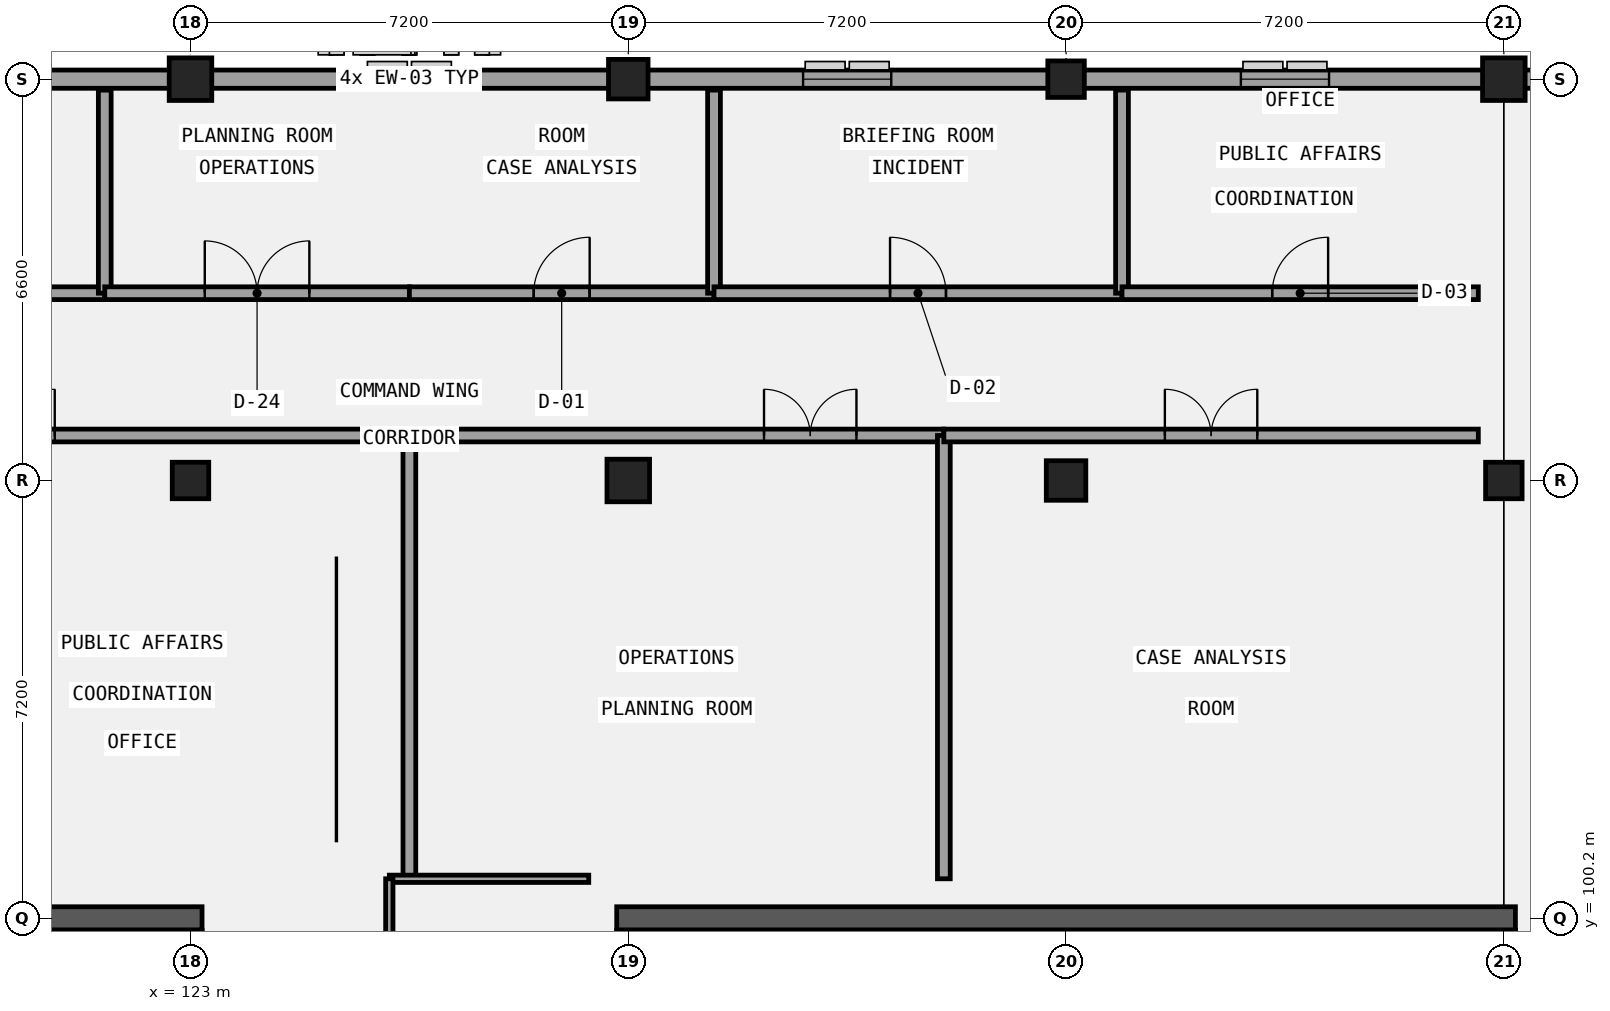
"""IFC4 building model, lengths in metres.
Left out: names, types, materials, properties, quantities, classifications, styles, units other than length and angle.
Written with IfcOpenShell. Run it as: python <this file> out.ifc"""

import sys

from ifc_helpers import new_model, si_unit, direction, frame, frame_2d, origin, origin_2d, place, context, subcontext, project, spatial, rectangle, extrude, element, fill, save


model = new_model("IFC4")
c1 = context("Model", 3, precision=1e-05, world=origin(), true_north=direction((0.0, 1.0)))
c2 = subcontext(c1, "Body", "Model", "MODEL_VIEW")
j1 = project(units=[si_unit("LENGTHUNIT", "METRE"), si_unit("PLANEANGLEUNIT", "RADIAN")], contexts=[c1])
p1 = place(None, origin())
s1 = spatial("IfcSite", under=j1, at=p1, CompositionType="ELEMENT")
p2 = place(p1, origin())
s2 = spatial("IfcBuilding", under=s1, at=p2, CompositionType="ELEMENT")
p3 = place(p2, frame((0.0, 0.0, 9.6)))
s3 = spatial("IfcBuildingStorey", under=s2, at=p3, CompositionType="ELEMENT", Elevation=9.6)
p4 = place(p3, frame((108.41, 100.2, 0.0), z_axis=(0.0, 0.0, 1.0), x_axis=(1.0, 0.0, 0.0)))
e1 = element("IfcWall", 1, at=p4, inside=s3, PredefinedType="SHEAR", context=c2, shape_type="SweptSolid", body=[
    extrude(rectangle(XDim=14.78, YDim=0.38, at=frame_2d((7.39, 0.0))), origin(), (0.0, 0.0, 1.0), 4.2),
])
p5 = place(p3, frame((123.0, 93.2, 0.0), z_axis=(0.0, 0.0, 1.0), x_axis=(0.0, 1.0, 0.0)))
e2 = element("IfcWall", 2, at=p5, inside=s3, PredefinedType="SHEAR", context=c2, shape_type="SweptSolid", body=[
    extrude(rectangle(XDim=6.8, YDim=0.38, at=frame_2d((3.4, 0.0))), origin(), (0.0, 0.0, 1.0), 4.2),
])
p6 = place(p3, frame((122.34, 96.82, 0.0), z_axis=(0.0, 0.0, 1.0), x_axis=(0.0, 1.0, 0.0)))
e3 = element("IfcWall", 3, at=p6, inside=s3, PredefinedType="SHEAR", context=c2, shape_type="SweptSolid", body=[
    extrude(rectangle(XDim=3.18, YDim=0.38, at=frame_2d((1.59, 0.0))), origin(), (0.0, 0.0, 1.0), 4.2),
])
p7 = place(p3, frame((130.01, 100.2, 0.0), z_axis=(0.0, 0.0, 1.0), x_axis=(1.0, 0.0, 0.0)))
e4 = element("IfcWall", 4, at=p7, inside=s3, PredefinedType="SHEAR", context=c2, shape_type="SweptSolid", body=[
    extrude(rectangle(XDim=14.78, YDim=0.38, at=frame_2d((7.39, 0.0))), origin(), (0.0, 0.0, 1.0), 4.2),
])
for number, where, z_axis, x_axis in (
    (5, (130.2, 93.2, 0.0), (0.0, 0.0, 1.0), (0.0, 1.0, 0.0)),
    (6, (144.6, 93.2, 0.0), (0.0, 0.0, 1.0), (0.0, 1.0, 0.0)),
):
    element("IfcWall", number, at=place(p3, frame(where, z_axis=z_axis, x_axis=x_axis)), inside=s3, PredefinedType="SHEAR", context=c2, shape_type="SweptSolid", body=[
        extrude(rectangle(XDim=6.8, YDim=0.38, at=frame_2d((3.4, 0.0))), origin(), (0.0, 0.0, 1.0), 4.2),
    ])
for number, where, z_axis, x_axis in (
    (7, (138.18, 96.82, 0.0), (0.0, 0.0, 1.0), (0.0, 1.0, 0.0)),
    (8, (140.1, 96.82, 0.0), (0.0, 0.0, 1.0), (0.0, 1.0, 0.0)),
    (9, (142.02, 96.82, 0.0), (0.0, 0.0, 1.0), (0.0, 1.0, 0.0)),
    (10, (143.94, 96.82, 0.0), (0.0, 0.0, 1.0), (0.0, 1.0, 0.0)),
):
    element("IfcWall", number, at=place(p3, frame(where, z_axis=z_axis, x_axis=x_axis)), inside=s3, PredefinedType="SHEAR", context=c2, shape_type="SweptSolid", body=[
        extrude(rectangle(XDim=3.18, YDim=0.38, at=frame_2d((1.59, 0.0))), origin(), (0.0, 0.0, 1.0), 4.2),
    ])
p8 = place(p3, frame((123.0, 107.4, 0.0), z_axis=(0.0, 0.0, 1.0), x_axis=(1.0, 0.0, 0.0)))
e11 = element("IfcColumn", 11, at=p8, inside=s3, PredefinedType="COLUMN", context=c2, shape_type="SweptSolid", body=[
    extrude(rectangle(XDim=0.6, YDim=0.6, at=origin_2d()), origin(), (0.0, 0.0, 1.0), 4.2),
])
for number, where, z_axis, x_axis in (
    (12, (123.0, 114.0, 0.0), (0.0, 0.0, 1.0), (1.0, 0.0, 0.0)),
    (13, (130.2, 107.4, 0.0), (0.0, 0.0, 1.0), (1.0, 0.0, 0.0)),
):
    element("IfcColumn", number, at=place(p3, frame(where, z_axis=z_axis, x_axis=x_axis)), inside=s3, PredefinedType="COLUMN", context=c2, shape_type="SweptSolid", body=[
        extrude(rectangle(XDim=0.7, YDim=0.7, at=origin_2d()), origin(), (0.0, 0.0, 1.0), 4.2),
    ])
for number, where, z_axis, x_axis in (
    (14, (130.2, 114.0, 0.0), (0.0, 0.0, 1.0), (1.0, 0.0, 0.0)),
    (15, (137.4, 107.4, 0.0), (0.0, 0.0, 1.0), (1.0, 0.0, 0.0)),
):
    element("IfcColumn", number, at=place(p3, frame(where, z_axis=z_axis, x_axis=x_axis)), inside=s3, PredefinedType="COLUMN", context=c2, shape_type="SweptSolid", body=[
        extrude(rectangle(XDim=0.65, YDim=0.65, at=origin_2d()), origin(), (0.0, 0.0, 1.0), 4.2),
    ])
for number, where, z_axis, x_axis in (
    (16, (137.4, 114.0, 0.0), (0.0, 0.0, 1.0), (1.0, 0.0, 0.0)),
    (17, (144.6, 107.4, 0.0), (0.0, 0.0, 1.0), (1.0, 0.0, 0.0)),
):
    element("IfcColumn", number, at=place(p3, frame(where, z_axis=z_axis, x_axis=x_axis)), inside=s3, PredefinedType="COLUMN", context=c2, shape_type="SweptSolid", body=[
        extrude(rectangle(XDim=0.6, YDim=0.6, at=origin_2d()), origin(), (0.0, 0.0, 1.0), 4.2),
    ])
p9 = place(p3, frame((144.6, 114.0, 0.0), z_axis=(0.0, 0.0, 1.0), x_axis=(1.0, 0.0, 0.0)))
e18 = element("IfcColumn", 18, at=p9, inside=s3, PredefinedType="COLUMN", context=c2, shape_type="SweptSolid", body=[
    extrude(rectangle(XDim=0.7, YDim=0.7, at=origin_2d()), origin(), (0.0, 0.0, 1.0), 4.2),
])
p10 = place(p3, frame((166.35, 114.0, 0.0), z_axis=(0.0, 0.0, 1.0), x_axis=(-1.0, 0.0, 0.0)))
e19 = element("IfcWall", 19, at=p10, inside=s3, PredefinedType="SOLIDWALL", context=c2, shape_type="SweptSolid", body=[
    extrude(rectangle(XDim=21.9, YDim=0.3, at=frame_2d((10.95, 0.0))), origin(), (0.0, 0.0, 1.0), 3.19),
])
p11 = place(p10, frame((17.5, 0.0, 0.95)))
e20 = element("IfcOpeningElement", 20, at=p11, cuts=e19, PredefinedType="OPENING", context=c2, shape_type="SweptSolid", body=[
    extrude(rectangle(XDim=1.3, YDim=1.65, at=frame_2d((0.65, 0.825))), frame((0.0, 0.16, 0.0), z_axis=(0.0, -1.0, 0.0), x_axis=(1.0, 0.0, 0.0)), (0.0, 0.0, 1.0), 0.32),
])
p12 = place(p3, frame((144.75, 114.0, 0.0), z_axis=(0.0, 0.0, 1.0), x_axis=(-1.0, 0.0, 0.0)))
e21 = element("IfcWall", 21, at=p12, inside=s3, PredefinedType="SOLIDWALL", context=c2, shape_type="SweptSolid", body=[
    extrude(rectangle(XDim=36.3, YDim=0.3, at=frame_2d((18.15, 0.0))), origin(), (0.0, 0.0, 1.0), 3.19),
])
p13 = place(p12, frame((31.9, 0.0, 0.95)))
e22 = element("IfcOpeningElement", 22, at=p13, cuts=e21, PredefinedType="OPENING", context=c2, shape_type="SweptSolid", body=[
    extrude(rectangle(XDim=1.3, YDim=1.65, at=frame_2d((0.65, 0.825))), frame((0.0, 0.16, 0.0), z_axis=(0.0, -1.0, 0.0), x_axis=(1.0, 0.0, 0.0)), (0.0, 0.0, 1.0), 0.32),
])
p14 = place(p12, frame((24.7, 0.0, 0.95)))
e23 = element("IfcOpeningElement", 23, at=p14, cuts=e21, PredefinedType="OPENING", context=c2, shape_type="SweptSolid", body=[
    extrude(rectangle(XDim=1.3, YDim=1.9, at=frame_2d((0.65, 0.95))), frame((0.0, 0.16, 0.0), z_axis=(0.0, -1.0, 0.0), x_axis=(1.0, 0.0, 0.0)), (0.0, 0.0, 1.0), 0.32),
])
p15 = place(p12, frame((17.425, 0.0, 0.95)))
e24 = element("IfcOpeningElement", 24, at=p15, cuts=e21, PredefinedType="OPENING", context=c2, shape_type="SweptSolid", body=[
    extrude(rectangle(XDim=1.45, YDim=1.4, at=frame_2d((0.725, 0.7))), frame((0.0, 0.16, 0.0), z_axis=(0.0, -1.0, 0.0), x_axis=(1.0, 0.0, 0.0)), (0.0, 0.0, 1.0), 0.32),
])
p16 = place(p12, frame((10.225, 0.0, 0.95)))
e25 = element("IfcOpeningElement", 25, at=p16, cuts=e21, PredefinedType="OPENING", context=c2, shape_type="SweptSolid", body=[
    extrude(rectangle(XDim=1.45, YDim=1.65, at=frame_2d((0.725, 0.825))), frame((0.0, 0.16, 0.0), z_axis=(0.0, -1.0, 0.0), x_axis=(1.0, 0.0, 0.0)), (0.0, 0.0, 1.0), 0.32),
])
p17 = place(p12, frame((3.025, 0.0, 0.95)))
e26 = element("IfcOpeningElement", 26, at=p17, cuts=e21, PredefinedType="OPENING", context=c2, shape_type="SweptSolid", body=[
    extrude(rectangle(XDim=1.45, YDim=1.9, at=frame_2d((0.725, 0.95))), frame((0.0, 0.16, 0.0), z_axis=(0.0, -1.0, 0.0), x_axis=(1.0, 0.0, 0.0)), (0.0, 0.0, 1.0), 0.32),
])
p18 = place(p3, frame((117.81, 108.14, 0.0), z_axis=(0.0, 0.0, 1.0), x_axis=(1.0, 0.0, 0.0)))
e27 = element("IfcWall", 27, at=p18, inside=s3, PredefinedType="PARTITIONING", context=c2, shape_type="SweptSolid", body=[
    extrude(rectangle(XDim=8.79, YDim=0.21, at=frame_2d((4.395, 0.0))), origin(), (0.0, 0.0, 1.0), 3.94),
])
p19 = place(p18, frame((1.438, 0.0, 0.0)))
e28 = element("IfcOpeningElement", 28, at=p19, cuts=e27, PredefinedType="OPENING", context=c2, shape_type="SweptSolid", body=[
    extrude(rectangle(XDim=1.52, YDim=2.1, at=frame_2d((0.76, 1.05))), frame((0.0, 0.115, 0.0), z_axis=(0.0, -1.0, 0.0), x_axis=(1.0, 0.0, 0.0)), (0.0, 0.0, 1.0), 0.23),
])
p20 = place(p3, frame((126.6, 100.85, 0.0), z_axis=(0.0, 0.0, 1.0), x_axis=(0.0, 1.0, 0.0)))
e29 = element("IfcWall", 29, at=p20, inside=s3, PredefinedType="PARTITIONING", context=c2, shape_type="SweptSolid", body=[
    extrude(rectangle(XDim=7.29, YDim=0.21, at=frame_2d((3.645, 0.0))), origin(), (0.0, 0.0, 1.0), 3.94),
])
p21 = place(p3, frame((126.6, 108.14, 0.0), z_axis=(0.0, 0.0, 1.0), x_axis=(1.0, 0.0, 0.0)))
e30 = element("IfcWall", 30, at=p21, inside=s3, PredefinedType="PARTITIONING", context=c2, shape_type="SweptSolid", body=[
    extrude(rectangle(XDim=8.79, YDim=0.21, at=frame_2d((4.395, 0.0))), origin(), (0.0, 0.0, 1.0), 3.94),
])
p22 = place(p21, frame((5.833, 0.0, 0.0)))
e31 = element("IfcOpeningElement", 31, at=p22, cuts=e30, PredefinedType="OPENING", context=c2, shape_type="SweptSolid", body=[
    extrude(rectangle(XDim=1.52, YDim=2.22, at=frame_2d((0.76, 1.11))), frame((0.0, 0.115, 0.0), z_axis=(0.0, -1.0, 0.0), x_axis=(1.0, 0.0, 0.0)), (0.0, 0.0, 1.0), 0.23),
])
p23 = place(p3, frame((135.39, 100.85, 0.0), z_axis=(0.0, 0.0, 1.0), x_axis=(0.0, 1.0, 0.0)))
e32 = element("IfcWall", 32, at=p23, inside=s3, PredefinedType="PARTITIONING", context=c2, shape_type="SweptSolid", body=[
    extrude(rectangle(XDim=7.29, YDim=0.21, at=frame_2d((3.645, 0.0))), origin(), (0.0, 0.0, 1.0), 3.94),
])
p24 = place(p3, frame((135.39, 108.14, 0.0), z_axis=(0.0, 0.0, 1.0), x_axis=(1.0, 0.0, 0.0)))
e33 = element("IfcWall", 33, at=p24, inside=s3, PredefinedType="PARTITIONING", context=c2, shape_type="SweptSolid", body=[
    extrude(rectangle(XDim=8.79, YDim=0.21, at=frame_2d((4.395, 0.0))), origin(), (0.0, 0.0, 1.0), 3.94),
])
p25 = place(p24, frame((3.635, 0.0, 0.0)))
e34 = element("IfcOpeningElement", 34, at=p25, cuts=e33, PredefinedType="OPENING", context=c2, shape_type="SweptSolid", body=[
    extrude(rectangle(XDim=1.52, YDim=2.35, at=frame_2d((0.76, 1.175))), frame((0.0, 0.115, 0.0), z_axis=(0.0, -1.0, 0.0), x_axis=(1.0, 0.0, 0.0)), (0.0, 0.0, 1.0), 0.23),
])
p26 = place(p3, frame((114.88, 110.48, 0.0), z_axis=(0.0, 0.0, 1.0), x_axis=(1.0, 0.0, 0.0)))
e35 = element("IfcWall", 35, at=p26, inside=s3, PredefinedType="PARTITIONING", context=c2, shape_type="SweptSolid", body=[
    extrude(rectangle(XDim=6.71, YDim=0.21, at=frame_2d((3.355, 0.0))), origin(), (0.0, 0.0, 1.0), 3.39),
])
p27 = place(p26, frame((2.495, 0.0, 0.0)))
e36 = element("IfcOpeningElement", 36, at=p27, cuts=e35, PredefinedType="OPENING", context=c2, shape_type="SweptSolid", body=[
    extrude(rectangle(XDim=1.72, YDim=2.22, at=frame_2d((0.86, 1.11))), frame((0.0, 0.115, 0.0), z_axis=(0.0, -1.0, 0.0), x_axis=(1.0, 0.0, 0.0)), (0.0, 0.0, 1.0), 0.23),
])
p28 = place(p3, frame((121.59, 110.48, 0.0), z_axis=(0.0, 0.0, 1.0), x_axis=(0.0, 1.0, 0.0)))
e37 = element("IfcWall", 37, at=p28, inside=s3, PredefinedType="PARTITIONING", context=c2, shape_type="SweptSolid", body=[
    extrude(rectangle(XDim=3.34, YDim=0.21, at=frame_2d((1.67, 0.0))), origin(), (0.0, 0.0, 1.0), 3.94),
])
p29 = place(p3, frame((121.59, 110.48, 0.0), z_axis=(0.0, 0.0, 1.0), x_axis=(1.0, 0.0, 0.0)))
e38 = element("IfcWall", 38, at=p29, inside=s3, PredefinedType="PARTITIONING", context=c2, shape_type="SweptSolid", body=[
    extrude(rectangle(XDim=5.01, YDim=0.21, at=frame_2d((2.505, 0.0))), origin(), (0.0, 0.0, 1.0), 3.39),
])
p30 = place(p29, frame((1.645, 0.0, 0.0)))
e39 = element("IfcOpeningElement", 39, at=p30, cuts=e38, PredefinedType="OPENING", context=c2, shape_type="SweptSolid", body=[
    extrude(rectangle(XDim=1.72, YDim=2.35, at=frame_2d((0.86, 1.175))), frame((0.0, 0.115, 0.0), z_axis=(0.0, -1.0, 0.0), x_axis=(1.0, 0.0, 0.0)), (0.0, 0.0, 1.0), 0.23),
])
p31 = place(p3, frame((126.6, 110.48, 0.0), z_axis=(0.0, 0.0, 1.0), x_axis=(1.0, 0.0, 0.0)))
e40 = element("IfcWall", 40, at=p31, inside=s3, PredefinedType="PARTITIONING", context=c2, shape_type="SweptSolid", body=[
    extrude(rectangle(XDim=5.01, YDim=0.21, at=frame_2d((2.505, 0.0))), origin(), (0.0, 0.0, 1.0), 3.39),
])
p32 = place(p31, frame((2.045, 0.0, 0.0)))
e41 = element("IfcOpeningElement", 41, at=p32, cuts=e40, PredefinedType="OPENING", context=c2, shape_type="SweptSolid", body=[
    extrude(rectangle(XDim=0.92, YDim=2.1, at=frame_2d((0.46, 1.05))), frame((0.0, 0.115, 0.0), z_axis=(0.0, -1.0, 0.0), x_axis=(1.0, 0.0, 0.0)), (0.0, 0.0, 1.0), 0.23),
])
p33 = place(p3, frame((131.61, 110.48, 0.0), z_axis=(0.0, 0.0, 1.0), x_axis=(0.0, 1.0, 0.0)))
e42 = element("IfcWall", 42, at=p33, inside=s3, PredefinedType="PARTITIONING", context=c2, shape_type="SweptSolid", body=[
    extrude(rectangle(XDim=3.34, YDim=0.21, at=frame_2d((1.67, 0.0))), origin(), (0.0, 0.0, 1.0), 3.94),
])
p34 = place(p3, frame((131.61, 110.48, 0.0), z_axis=(0.0, 0.0, 1.0), x_axis=(1.0, 0.0, 0.0)))
e43 = element("IfcWall", 43, at=p34, inside=s3, PredefinedType="PARTITIONING", context=c2, shape_type="SweptSolid", body=[
    extrude(rectangle(XDim=6.71, YDim=0.21, at=frame_2d((3.355, 0.0))), origin(), (0.0, 0.0, 1.0), 3.39),
])
p35 = place(p34, frame((2.895, 0.0, 0.0)))
e44 = element("IfcOpeningElement", 44, at=p35, cuts=e43, PredefinedType="OPENING", context=c2, shape_type="SweptSolid", body=[
    extrude(rectangle(XDim=0.92, YDim=2.22, at=frame_2d((0.46, 1.11))), frame((0.0, 0.115, 0.0), z_axis=(0.0, -1.0, 0.0), x_axis=(1.0, 0.0, 0.0)), (0.0, 0.0, 1.0), 0.23),
])
p36 = place(p3, frame((138.32, 110.48, 0.0), z_axis=(0.0, 0.0, 1.0), x_axis=(0.0, 1.0, 0.0)))
e45 = element("IfcWall", 45, at=p36, inside=s3, PredefinedType="PARTITIONING", context=c2, shape_type="SweptSolid", body=[
    extrude(rectangle(XDim=3.34, YDim=0.21, at=frame_2d((1.67, 0.0))), origin(), (0.0, 0.0, 1.0), 3.94),
])
p37 = place(p3, frame((138.32, 110.48, 0.0), z_axis=(0.0, 0.0, 1.0), x_axis=(1.0, 0.0, 0.0)))
e46 = element("IfcWall", 46, at=p37, inside=s3, PredefinedType="PARTITIONING", context=c2, shape_type="SweptSolid", body=[
    extrude(rectangle(XDim=5.86, YDim=0.21, at=frame_2d((2.93, 0.0))), origin(), (0.0, 0.0, 1.0), 3.39),
])
p38 = place(p37, frame((2.47, 0.0, 0.0)))
e47 = element("IfcOpeningElement", 47, at=p38, cuts=e46, PredefinedType="OPENING", context=c2, shape_type="SweptSolid", body=[
    extrude(rectangle(XDim=0.92, YDim=2.35, at=frame_2d((0.46, 1.175))), frame((0.0, 0.115, 0.0), z_axis=(0.0, -1.0, 0.0), x_axis=(1.0, 0.0, 0.0)), (0.0, 0.0, 1.0), 0.23),
])
p39 = place(p3, frame((126.27, 100.85, 0.0), z_axis=(0.0, 0.0, 1.0), x_axis=(1.0, 0.0, 0.0)))
e48 = element("IfcWall", 48, at=p39, inside=s3, PredefinedType="PARTITIONING", context=c2, shape_type="SweptSolid", body=[
    extrude(rectangle(XDim=3.28, YDim=0.12, at=frame_2d((1.64, 0.0))), origin(), (0.0, 0.0, 1.0), 3.94),
])
p40 = place(p3, frame((126.27, 95.425, 0.0), z_axis=(0.0, 0.0, 1.0), x_axis=(0.0, 1.0, 0.0)))
e49 = element("IfcWall", 49, at=p40, inside=s3, PredefinedType="PARTITIONING", context=c2, shape_type="SweptSolid", body=[
    extrude(rectangle(XDim=5.425, YDim=0.12, at=frame_2d((2.712, 0.0))), origin(), (0.0, 0.0, 1.0), 3.94),
])
p41 = place(p40, frame((2.163, 0.0, 0.0)))
e50 = element("IfcOpeningElement", 50, at=p41, cuts=e49, PredefinedType="OPENING", context=c2, shape_type="SweptSolid", body=[
    extrude(rectangle(XDim=1.1, YDim=2.22, at=frame_2d((0.55, 1.11))), frame((0.0, 0.07, 0.0), z_axis=(0.0, -1.0, 0.0), x_axis=(1.0, 0.0, 0.0)), (0.0, 0.0, 1.0), 0.14),
])
p42 = place(p15, origin())
e51 = element("IfcWindow", 51, at=p42, inside=s3, PartitioningType="SINGLE_PANEL", PredefinedType="WINDOW", context=c2, shape_type="SweptSolid", body=[
    extrude(rectangle(XDim=1.45, YDim=1.4, at=frame_2d((0.725, 0.7))), frame((0.0, 0.03, 0.0), z_axis=(0.0, -1.0, 0.0), x_axis=(1.0, 0.0, 0.0)), (0.0, 0.0, 1.0), 0.06),
])
fill(e24, e51)
p43 = place(p16, origin())
e52 = element("IfcWindow", 52, at=p43, inside=s3, PartitioningType="SINGLE_PANEL", PredefinedType="WINDOW", context=c2, shape_type="SweptSolid", body=[
    extrude(rectangle(XDim=1.45, YDim=1.65, at=frame_2d((0.725, 0.825))), frame((0.0, 0.03, 0.0), z_axis=(0.0, -1.0, 0.0), x_axis=(1.0, 0.0, 0.0)), (0.0, 0.0, 1.0), 0.06),
])
fill(e25, e52)
p44 = place(p17, origin())
e53 = element("IfcWindow", 53, at=p44, inside=s3, PartitioningType="SINGLE_PANEL", PredefinedType="WINDOW", context=c2, shape_type="SweptSolid", body=[
    extrude(rectangle(XDim=1.45, YDim=1.9, at=frame_2d((0.725, 0.95))), frame((0.0, 0.03, 0.0), z_axis=(0.0, -1.0, 0.0), x_axis=(1.0, 0.0, 0.0)), (0.0, 0.0, 1.0), 0.06),
])
fill(e26, e53)
p45 = place(p19, frame((1.52, 0.0, 0.0), z_axis=(0.0, 0.0, 1.0), x_axis=(-1.0, 0.0, 0.0)))
e54 = element("IfcDoor", 54, at=p45, inside=s3, OperationType="DOUBLE_DOOR_SINGLE_SWING", PredefinedType="DOOR", context=c2, shape_type="SweptSolid", body=[
    extrude(rectangle(XDim=1.52, YDim=2.1, at=frame_2d((0.76, 1.05))), frame((0.0, 0.025, 0.0), z_axis=(0.0, -1.0, 0.0), x_axis=(1.0, 0.0, 0.0)), (0.0, 0.0, 1.0), 0.05),
])
fill(e28, e54)
p46 = place(p22, frame((1.52, 0.0, 0.0), z_axis=(0.0, 0.0, 1.0), x_axis=(-1.0, 0.0, 0.0)))
e55 = element("IfcDoor", 55, at=p46, inside=s3, OperationType="DOUBLE_DOOR_SINGLE_SWING", PredefinedType="DOOR", context=c2, shape_type="SweptSolid", body=[
    extrude(rectangle(XDim=1.52, YDim=2.22, at=frame_2d((0.76, 1.11))), frame((0.0, 0.025, 0.0), z_axis=(0.0, -1.0, 0.0), x_axis=(1.0, 0.0, 0.0)), (0.0, 0.0, 1.0), 0.05),
])
fill(e31, e55)
p47 = place(p25, frame((1.52, 0.0, 0.0), z_axis=(0.0, 0.0, 1.0), x_axis=(-1.0, 0.0, 0.0)))
e56 = element("IfcDoor", 56, at=p47, inside=s3, OperationType="DOUBLE_DOOR_SINGLE_SWING", PredefinedType="DOOR", context=c2, shape_type="SweptSolid", body=[
    extrude(rectangle(XDim=1.52, YDim=2.35, at=frame_2d((0.76, 1.175))), frame((0.0, 0.025, 0.0), z_axis=(0.0, -1.0, 0.0), x_axis=(1.0, 0.0, 0.0)), (0.0, 0.0, 1.0), 0.05),
])
fill(e34, e56)
p48 = place(p30, origin())
e57 = element("IfcDoor", 57, at=p48, inside=s3, OperationType="DOUBLE_DOOR_SINGLE_SWING", PredefinedType="DOOR", context=c2, shape_type="SweptSolid", body=[
    extrude(rectangle(XDim=1.72, YDim=2.35, at=frame_2d((0.86, 1.175))), frame((0.0, 0.025, 0.0), z_axis=(0.0, -1.0, 0.0), x_axis=(1.0, 0.0, 0.0)), (0.0, 0.0, 1.0), 0.05),
])
fill(e39, e57)
p49 = place(p32, origin())
e58 = element("IfcDoor", 58, at=p49, inside=s3, OperationType="SINGLE_SWING_RIGHT", PredefinedType="DOOR", context=c2, shape_type="SweptSolid", body=[
    extrude(rectangle(XDim=0.92, YDim=2.1, at=frame_2d((0.46, 1.05))), frame((0.0, 0.025, 0.0), z_axis=(0.0, -1.0, 0.0), x_axis=(1.0, 0.0, 0.0)), (0.0, 0.0, 1.0), 0.05),
])
fill(e41, e58)
p50 = place(p35, origin())
e59 = element("IfcDoor", 59, at=p50, inside=s3, OperationType="SINGLE_SWING_LEFT", PredefinedType="DOOR", context=c2, shape_type="SweptSolid", body=[
    extrude(rectangle(XDim=0.92, YDim=2.22, at=frame_2d((0.46, 1.11))), frame((0.0, 0.025, 0.0), z_axis=(0.0, -1.0, 0.0), x_axis=(1.0, 0.0, 0.0)), (0.0, 0.0, 1.0), 0.05),
])
fill(e44, e59)
p51 = place(p38, origin())
e60 = element("IfcDoor", 60, at=p51, inside=s3, OperationType="SINGLE_SWING_RIGHT", PredefinedType="DOOR", context=c2, shape_type="SweptSolid", body=[
    extrude(rectangle(XDim=0.92, YDim=2.35, at=frame_2d((0.46, 1.175))), frame((0.0, 0.025, 0.0), z_axis=(0.0, -1.0, 0.0), x_axis=(1.0, 0.0, 0.0)), (0.0, 0.0, 1.0), 0.05),
])
fill(e47, e60)
save(model, sys.argv[1])
